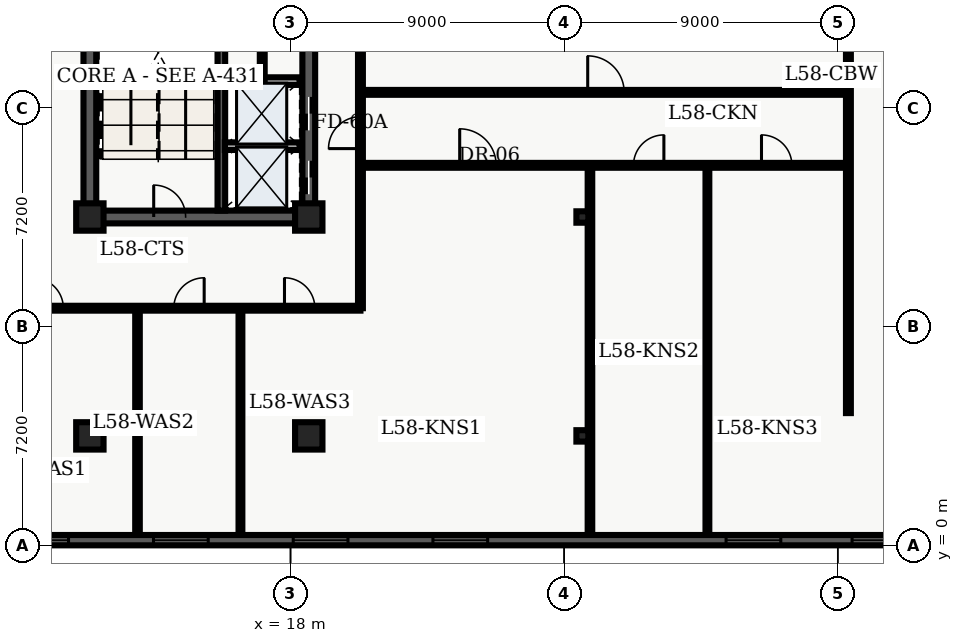
"""IFC4 building model, lengths in metres.
Left out: names, types, materials, properties, quantities, classifications, styles, units other than length and angle.
Written with IfcOpenShell. Run it as: python <this file> out.ifc"""

import sys

from ifc_helpers import new_model, entity, si_unit, converted_unit, direction, frame, origin_with_axes, origin_2d_with_axis, place, context, subcontext, project, spatial, polyline, rectangle, i_section, outline, extrude, element, fill, save


model = new_model("IFC4")
c1 = context("Model", 3, precision=1e-05, world=origin_with_axes(), true_north=direction((0.0, 1.0)))
c2 = subcontext(c1, "Body", "Model", "MODEL_VIEW")
j1 = project(units=[si_unit("LENGTHUNIT", "METRE"), converted_unit("PLANEANGLEUNIT", "DEGREE", entity("IfcPlaneAngleMeasure", 0.017), si_unit("PLANEANGLEUNIT", "RADIAN"), dimensions=[0, 0, 0, 0, 0, 0, 0])], contexts=[c1])
p1 = place(None, origin_with_axes())
s1 = spatial("IfcSite", under=j1, at=p1, CompositionType="ELEMENT")
p2 = place(p1, origin_with_axes())
s2 = spatial("IfcBuilding", under=s1, at=p2, CompositionType="ELEMENT")
p3 = place(p2, frame((0.0, 0.0, 236.4), z_axis=(0.0, 0.0, 1.0), x_axis=(1.0, 0.0, 0.0)))
s3 = spatial("IfcBuildingStorey", under=s2, at=p3, CompositionType="ELEMENT", Elevation=236.4)
p4 = place(p3, frame((11.4, 10.8, 0.0), z_axis=(0.0, 0.0, 1.0), x_axis=(0.0, 1.0, 0.0)))
e1 = element("IfcWall", 1, at=p4, inside=s3, PredefinedType="SHEAR", context=c2, shape_type="SweptSolid", body=[
    extrude(outline(polyline([(0.0, -0.21), (27.0, -0.21), (27.0, 0.21), (0.0, 0.21), (0.0, -0.21)])), origin_with_axes(), (0.0, 0.0, 1.0), 3.66),
])
p5 = place(p3, frame((11.4, 10.8, 0.0), z_axis=(0.0, 0.0, 1.0), x_axis=(1.0, 0.0, 0.0)))
e2 = element("IfcWall", 2, at=p5, inside=s3, PredefinedType="SHEAR", context=c2, shape_type="SweptSolid", body=[
    extrude(outline(polyline([(0.0, -0.21), (7.2, -0.21), (7.2, 0.21), (0.0, 0.21), (0.0, -0.21)])), origin_with_axes(), (0.0, 0.0, 1.0), 3.66),
])
p6 = place(p5, frame((2.625, 0.0, 0.0), z_axis=(0.0, 0.0, 1.0), x_axis=(1.0, 0.0, 0.0)))
e3 = element("IfcOpeningElement", 3, at=p6, cuts=e2, PredefinedType="OPENING", context=c2, shape_type="SweptSolid", body=[
    extrude(rectangle(XDim=1.05, YDim=0.44, at=origin_2d_with_axis()), origin_with_axes(), (0.0, 0.0, 1.0), 2.15),
])
p7 = place(p3, frame((18.6, 10.8, 0.0), z_axis=(0.0, 0.0, 1.0), x_axis=(0.0, 1.0, 0.0)))
e4 = element("IfcWall", 4, at=p7, inside=s3, PredefinedType="SHEAR", context=c2, shape_type="SweptSolid", body=[
    extrude(outline(polyline([(0.0, -0.21), (13.5, -0.21), (13.5, 0.21), (0.0, 0.21), (0.0, -0.21)])), origin_with_axes(), (0.0, 0.0, 1.0), 3.66),
])
p8 = place(p7, frame((1.3, 0.0, 0.0), z_axis=(0.0, 0.0, 1.0), x_axis=(1.0, 0.0, 0.0)))
e5 = element("IfcOpeningElement", 5, at=p8, cuts=e4, PredefinedType="OPENING", context=c2, shape_type="SweptSolid", body=[
    extrude(rectangle(XDim=1.1, YDim=0.44, at=origin_2d_with_axis()), origin_with_axes(), (0.0, 0.0, 1.0), 2.15),
])
p9 = place(p7, frame((3.4, 0.0, 0.0), z_axis=(0.0, 0.0, 1.0), x_axis=(1.0, 0.0, 0.0)))
e6 = element("IfcOpeningElement", 6, at=p9, cuts=e4, PredefinedType="OPENING", context=c2, shape_type="SweptSolid", body=[
    extrude(rectangle(XDim=1.1, YDim=0.44, at=origin_2d_with_axis()), origin_with_axes(), (0.0, 0.0, 1.0), 2.15),
])
p10 = place(p7, frame((11.125, 0.0, 0.0), z_axis=(0.0, 0.0, 1.0), x_axis=(1.0, 0.0, 0.0)))
e7 = element("IfcOpeningElement", 7, at=p10, cuts=e4, PredefinedType="OPENING", context=c2, shape_type="SweptSolid", body=[
    extrude(rectangle(XDim=1.05, YDim=0.44, at=origin_2d_with_axis()), origin_with_axes(), (0.0, 0.0, 1.0), 2.15),
])
p11 = place(p7, frame((6.675, 0.0, 0.0), z_axis=(0.0, 0.0, 1.0), x_axis=(1.0, 0.0, 0.0)))
e8 = element("IfcOpeningElement", 8, at=p11, cuts=e4, PredefinedType="OPENING", context=c2, shape_type="SweptSolid", body=[
    extrude(rectangle(XDim=0.95, YDim=0.44, at=origin_2d_with_axis()), origin_with_axes(), (0.0, 0.0, 1.0), 2.15),
])
p12 = place(p3, frame((15.725, 11.01, 0.0), z_axis=(0.0, 0.0, 1.0), x_axis=(0.0, 1.0, 0.0)))
e9 = element("IfcWall", 9, at=p12, inside=s3, PredefinedType="SHEAR", context=c2, shape_type="SweptSolid", body=[
    extrude(outline(polyline([(0.0, -0.125), (8.69, -0.125), (8.69, 0.125), (0.0, 0.125), (0.0, -0.125)])), origin_with_axes(), (0.0, 0.0, 1.0), 3.66),
])
for number, where, z_axis, x_axis in (
    (10, (11.4, 3.6, 0.0), (0.0, 0.0, 1.0), (1.0, 0.0, 0.0)),
    (11, (11.4, 10.8, 0.0), (0.0, 0.0, 1.0), (1.0, 0.0, 0.0)),
    (12, (18.6, 3.6, 0.0), (0.0, 0.0, 1.0), (1.0, 0.0, 0.0)),
    (13, (18.6, 10.8, 0.0), (0.0, 0.0, 1.0), (1.0, 0.0, 0.0)),
):
    element("IfcColumn", number, at=place(p3, frame(where, z_axis=z_axis, x_axis=x_axis)), inside=s3, PredefinedType="COLUMN", context=c2, shape_type="SweptSolid", body=[
        extrude(rectangle(XDim=0.9, YDim=0.9, at=origin_2d_with_axis()), origin_with_axes(), (0.0, 0.0, 1.0), 3.9),
    ])
for number, where, z_axis, x_axis in (
    (14, (27.6, 3.6, 0.0), (0.0, 0.0, 1.0), (1.0, 0.0, 0.0)),
    (15, (27.6, 10.8, 0.0), (0.0, 0.0, 1.0), (1.0, 0.0, 0.0)),
):
    element("IfcColumn", number, at=place(p3, frame(where, z_axis=z_axis, x_axis=x_axis)), inside=s3, PredefinedType="COLUMN", context=c2, shape_type="SweptSolid", body=[
        extrude(i_section(OverallWidth=0.394, OverallDepth=0.375, WebThickness=0.017, FlangeThickness=0.028, FilletRadius=0.02, at=origin_2d_with_axis()), origin_with_axes(), (0.0, 0.0, 1.0), 3.9),
    ])
for number, where, z_axis, x_axis in (
    (16, (15.84, 13.13, 0.0), (0.0, 0.0, 1.0), (1.0, 0.0, 0.0)),
    (17, (15.84, 15.27, 0.0), (0.0, 0.0, 1.0), (1.0, 0.0, 0.0)),
):
    element("IfcWall", number, at=place(p3, frame(where, z_axis=z_axis, x_axis=x_axis)), inside=s3, PredefinedType="SOLIDWALL", context=c2, shape_type="SweptSolid", body=[
        extrude(outline(polyline([(0.0, -0.125), (2.46, -0.125), (2.46, 0.125), (0.0, 0.125), (0.0, -0.125)])), origin_with_axes(), (0.0, 0.0, 1.0), 2.7),
    ])
p13 = place(p3, frame((17.07, 15.34, 0.0), z_axis=(0.0, 0.0, 1.0), x_axis=(0.0, 1.0, 0.0)))
e18 = element("IfcWall", 18, at=p13, inside=s3, PredefinedType="PARTITIONING", context=c2, shape_type="SweptSolid", body=[
    extrude(outline(polyline([(0.0, -0.08), (4.36, -0.08), (4.36, 0.08), (0.0, 0.08), (0.0, -0.08)])), origin_with_axes(), (0.0, 0.0, 1.0), 2.7),
])
p14 = place(p13, frame((2.05, 0.0, 0.0), z_axis=(0.0, 0.0, 1.0), x_axis=(1.0, 0.0, 0.0)))
e19 = element("IfcOpeningElement", 19, at=p14, cuts=e18, PredefinedType="OPENING", context=c2, shape_type="SweptSolid", body=[
    extrude(rectangle(XDim=0.9, YDim=0.18, at=origin_2d_with_axis()), origin_with_axes(), (0.0, 0.0, 1.0), 2.15),
])
p15 = place(p3, frame((7.1, 7.8, 0.0), z_axis=(0.0, 0.0, 1.0), x_axis=(1.0, 0.0, 0.0)))
e20 = element("IfcWall", 20, at=p15, inside=s3, PredefinedType="PARTITIONING", context=c2, shape_type="SweptSolid", body=[
    extrude(outline(polyline([(0.0, -0.08), (13.2, -0.08), (13.2, 0.08), (0.0, 0.08), (0.0, -0.08)])), origin_with_axes(), (0.0, 0.0, 1.0), 2.7),
])
p16 = place(p15, frame((2.929, 0.0, 0.0), z_axis=(0.0, 0.0, 1.0), x_axis=(1.0, 0.0, 0.0)))
e21 = element("IfcOpeningElement", 21, at=p16, cuts=e20, PredefinedType="OPENING", context=c2, shape_type="SweptSolid", body=[
    extrude(rectangle(XDim=1.0, YDim=0.18, at=origin_2d_with_axis()), origin_with_axes(), (0.0, 0.0, 1.0), 2.15),
])
p17 = place(p15, frame((7.56, 0.0, 0.0), z_axis=(0.0, 0.0, 1.0), x_axis=(1.0, 0.0, 0.0)))
e22 = element("IfcOpeningElement", 22, at=p17, cuts=e20, PredefinedType="OPENING", context=c2, shape_type="SweptSolid", body=[
    extrude(rectangle(XDim=1.0, YDim=0.18, at=origin_2d_with_axis()), origin_with_axes(), (0.0, 0.0, 1.0), 2.15),
])
p18 = place(p15, frame((11.201, 0.0, 0.0), z_axis=(0.0, 0.0, 1.0), x_axis=(1.0, 0.0, 0.0)))
e23 = element("IfcOpeningElement", 23, at=p18, cuts=e20, PredefinedType="OPENING", context=c2, shape_type="SweptSolid", body=[
    extrude(rectangle(XDim=1.0, YDim=0.18, at=origin_2d_with_axis()), origin_with_axes(), (0.0, 0.0, 1.0), 2.15),
])
p19 = place(p3, frame((20.3, 7.8, 0.0), z_axis=(0.0, 0.0, 1.0), x_axis=(0.0, 1.0, 0.0)))
e24 = element("IfcWall", 24, at=p19, inside=s3, PredefinedType="PARTITIONING", context=c2, shape_type="SweptSolid", body=[
    extrude(outline(polyline([(0.0, -0.08), (32.7, -0.08), (32.7, 0.08), (0.0, 0.08), (0.0, -0.08)])), origin_with_axes(), (0.0, 0.0, 1.0), 2.7),
])
p20 = place(p19, frame((14.556, 0.0, 0.0), z_axis=(0.0, 0.0, 1.0), x_axis=(1.0, 0.0, 0.0)))
e25 = element("IfcOpeningElement", 25, at=p20, cuts=e24, PredefinedType="OPENING", context=c2, shape_type="SweptSolid", body=[
    extrude(rectangle(XDim=0.9, YDim=0.18, at=origin_2d_with_axis()), origin_with_axes(), (0.0, 0.0, 1.0), 2.15),
])
p21 = place(p19, frame((18.551, 0.0, 0.0), z_axis=(0.0, 0.0, 1.0), x_axis=(1.0, 0.0, 0.0)))
e26 = element("IfcOpeningElement", 26, at=p21, cuts=e24, PredefinedType="OPENING", context=c2, shape_type="SweptSolid", body=[
    extrude(rectangle(XDim=1.0, YDim=0.18, at=origin_2d_with_axis()), origin_with_axes(), (0.0, 0.0, 1.0), 2.15),
])
p22 = place(p19, frame((22.226, 0.0, 0.0), z_axis=(0.0, 0.0, 1.0), x_axis=(1.0, 0.0, 0.0)))
e27 = element("IfcOpeningElement", 27, at=p22, cuts=e24, PredefinedType="OPENING", context=c2, shape_type="SweptSolid", body=[
    extrude(rectangle(XDim=1.0, YDim=0.18, at=origin_2d_with_axis()), origin_with_axes(), (0.0, 0.0, 1.0), 2.15),
])
p23 = place(p19, frame((25.754, 0.0, 0.0), z_axis=(0.0, 0.0, 1.0), x_axis=(1.0, 0.0, 0.0)))
e28 = element("IfcOpeningElement", 28, at=p23, cuts=e24, PredefinedType="OPENING", context=c2, shape_type="SweptSolid", body=[
    extrude(rectangle(XDim=1.0, YDim=0.18, at=origin_2d_with_axis()), origin_with_axes(), (0.0, 0.0, 1.0), 2.15),
])
p24 = place(p19, frame((5.775, 0.0, 0.0), z_axis=(0.0, 0.0, 1.0), x_axis=(1.0, 0.0, 0.0)))
e29 = element("IfcOpeningElement", 29, at=p24, cuts=e24, PredefinedType="OPENING", context=c2, shape_type="SweptSolid", body=[
    extrude(rectangle(XDim=1.05, YDim=0.18, at=origin_2d_with_axis()), origin_with_axes(), (0.0, 0.0, 1.0), 2.15),
])
p25 = place(p3, frame((12.967, 0.335, 0.0), z_axis=(0.0, 0.0, 1.0), x_axis=(0.0, 1.0, 0.0)))
e30 = element("IfcWall", 30, at=p25, inside=s3, PredefinedType="PARTITIONING", context=c2, shape_type="SweptSolid", body=[
    extrude(outline(polyline([(0.0, -0.075), (7.365, -0.075), (7.365, 0.075), (0.0, 0.075), (0.0, -0.075)])), origin_with_axes(), (0.0, 0.0, 1.0), 2.7),
])
p26 = place(p3, frame((16.353, 0.335, 0.0), z_axis=(0.0, 0.0, 1.0), x_axis=(0.0, 1.0, 0.0)))
e31 = element("IfcWall", 31, at=p26, inside=s3, PredefinedType="PARTITIONING", context=c2, shape_type="SweptSolid", body=[
    extrude(outline(polyline([(0.0, -0.062), (7.365, -0.062), (7.365, 0.062), (0.0, 0.062), (0.0, -0.062)])), origin_with_axes(), (0.0, 0.0, 1.0), 2.7),
])
p27 = place(p3, frame((20.3, 12.5, 0.0), z_axis=(0.0, 0.0, 1.0), x_axis=(1.0, 0.0, 0.0)))
e32 = element("IfcWall", 32, at=p27, inside=s3, PredefinedType="PARTITIONING", context=c2, shape_type="SweptSolid", body=[
    extrude(outline(polyline([(0.0, -0.08), (16.05, -0.08), (16.05, 0.08), (0.0, 0.08), (0.0, -0.08)])), origin_with_axes(), (0.0, 0.0, 1.0), 2.7),
])
p28 = place(p27, frame((3.865, 0.0, 0.0), z_axis=(0.0, 0.0, 1.0), x_axis=(1.0, 0.0, 0.0)))
e33 = element("IfcOpeningElement", 33, at=p28, cuts=e32, PredefinedType="OPENING", context=c2, shape_type="SweptSolid", body=[
    extrude(rectangle(XDim=1.2, YDim=0.18, at=origin_2d_with_axis()), origin_with_axes(), (0.0, 0.0, 1.0), 2.2),
])
p29 = place(p27, frame((9.48, 0.0, 0.0), z_axis=(0.0, 0.0, 1.0), x_axis=(1.0, 0.0, 0.0)))
e34 = element("IfcOpeningElement", 34, at=p29, cuts=e32, PredefinedType="OPENING", context=c2, shape_type="SweptSolid", body=[
    extrude(rectangle(XDim=1.0, YDim=0.18, at=origin_2d_with_axis()), origin_with_axes(), (0.0, 0.0, 1.0), 2.15),
])
p30 = place(p27, frame((13.691, 0.0, 0.0), z_axis=(0.0, 0.0, 1.0), x_axis=(1.0, 0.0, 0.0)))
e35 = element("IfcOpeningElement", 35, at=p30, cuts=e32, PredefinedType="OPENING", context=c2, shape_type="SweptSolid", body=[
    extrude(rectangle(XDim=1.0, YDim=0.18, at=origin_2d_with_axis()), origin_with_axes(), (0.0, 0.0, 1.0), 2.15),
])
p31 = place(p3, frame((20.3, 14.9, 0.0), z_axis=(0.0, 0.0, 1.0), x_axis=(1.0, 0.0, 0.0)))
e36 = element("IfcWall", 36, at=p31, inside=s3, PredefinedType="PARTITIONING", context=c2, shape_type="SweptSolid", body=[
    extrude(outline(polyline([(0.0, -0.08), (16.05, -0.08), (16.05, 0.08), (0.0, 0.08), (0.0, -0.08)])), origin_with_axes(), (0.0, 0.0, 1.0), 2.7),
])
p32 = place(p31, frame((8.075, 0.0, 0.0), z_axis=(0.0, 0.0, 1.0), x_axis=(1.0, 0.0, 0.0)))
e37 = element("IfcOpeningElement", 37, at=p32, cuts=e36, PredefinedType="OPENING", context=c2, shape_type="SweptSolid", body=[
    extrude(rectangle(XDim=1.2, YDim=0.18, at=origin_2d_with_axis()), origin_with_axes(), (0.0, 0.0, 1.0), 2.2),
])
p33 = place(p3, frame((36.35, 4.35, 0.0), z_axis=(0.0, 0.0, 1.0), x_axis=(0.0, 1.0, 0.0)))
e38 = element("IfcWall", 38, at=p33, inside=s3, PredefinedType="PARTITIONING", context=c2, shape_type="SweptSolid", body=[
    extrude(outline(polyline([(0.0, -0.08), (16.95, -0.08), (16.95, 0.08), (0.0, 0.08), (0.0, -0.08)])), origin_with_axes(), (0.0, 0.0, 1.0), 2.7),
])
p34 = place(p3, frame((27.849, 0.335, 0.0), z_axis=(0.0, 0.0, 1.0), x_axis=(0.0, 1.0, 0.0)))
e39 = element("IfcWall", 39, at=p34, inside=s3, PredefinedType="PARTITIONING", context=c2, shape_type="SweptSolid", body=[
    extrude(outline(polyline([(0.0, -0.075), (12.045, -0.075), (12.045, 0.075), (0.0, 0.075), (0.0, -0.075)])), origin_with_axes(), (0.0, 0.0, 1.0), 2.7),
])
p35 = place(p3, frame((31.712, 0.335, 0.0), z_axis=(0.0, 0.0, 1.0), x_axis=(0.0, 1.0, 0.0)))
e40 = element("IfcWall", 40, at=p35, inside=s3, PredefinedType="PARTITIONING", context=c2, shape_type="SweptSolid", body=[
    extrude(outline(polyline([(0.0, -0.062), (12.045, -0.062), (12.045, 0.062), (0.0, 0.062), (0.0, -0.062)])), origin_with_axes(), (0.0, 0.0, 1.0), 2.7),
])
p36 = place(p3, frame((49.46, 0.17, 0.0), z_axis=(0.0, 0.0, 1.0), x_axis=(-1.0, 0.0, 0.0)))
e41 = element("IfcWall", 41, at=p36, inside=s3, PredefinedType="SOLIDWALL", context=c2, shape_type="SweptSolid", body=[
    extrude(outline(polyline([(0.0, -0.17), (42.56, -0.17), (42.56, 0.17), (0.0, 0.17), (0.0, -0.17)])), origin_with_axes(), (0.0, 0.0, 1.0), 3.66),
])
p37 = place(p36, frame((2.898, 0.0, 0.45), z_axis=(0.0, 0.0, 1.0), x_axis=(1.0, 0.0, 0.0)))
e42 = element("IfcOpeningElement", 42, at=p37, cuts=e41, PredefinedType="OPENING", context=c2, shape_type="SweptSolid", body=[
    extrude(rectangle(XDim=1.8, YDim=0.36, at=origin_2d_with_axis()), origin_with_axes(), (0.0, 0.0, 1.0), 2.1),
])
p38 = place(p36, frame((7.493, 0.0, 0.45), z_axis=(0.0, 0.0, 1.0), x_axis=(1.0, 0.0, 0.0)))
e43 = element("IfcOpeningElement", 43, at=p38, cuts=e41, PredefinedType="OPENING", context=c2, shape_type="SweptSolid", body=[
    extrude(rectangle(XDim=1.8, YDim=0.36, at=origin_2d_with_axis()), origin_with_axes(), (0.0, 0.0, 1.0), 2.1),
])
p39 = place(p36, frame((12.089, 0.0, 0.45), z_axis=(0.0, 0.0, 1.0), x_axis=(1.0, 0.0, 0.0)))
e44 = element("IfcOpeningElement", 44, at=p39, cuts=e41, PredefinedType="OPENING", context=c2, shape_type="SweptSolid", body=[
    extrude(rectangle(XDim=1.8, YDim=0.36, at=origin_2d_with_axis()), origin_with_axes(), (0.0, 0.0, 1.0), 2.1),
])
p40 = place(p36, frame((16.234, 0.0, 0.45), z_axis=(0.0, 0.0, 1.0), x_axis=(1.0, 0.0, 0.0)))
e45 = element("IfcOpeningElement", 45, at=p40, cuts=e41, PredefinedType="OPENING", context=c2, shape_type="SweptSolid", body=[
    extrude(rectangle(XDim=1.8, YDim=0.36, at=origin_2d_with_axis()), origin_with_axes(), (0.0, 0.0, 1.0), 2.1),
])
p41 = place(p36, frame((25.876, 0.0, 0.45), z_axis=(0.0, 0.0, 1.0), x_axis=(1.0, 0.0, 0.0)))
e46 = element("IfcOpeningElement", 46, at=p41, cuts=e41, PredefinedType="OPENING", context=c2, shape_type="SweptSolid", body=[
    extrude(rectangle(XDim=1.8, YDim=0.36, at=origin_2d_with_axis()), origin_with_axes(), (0.0, 0.0, 1.0), 2.1),
])
p42 = place(p36, frame((30.471, 0.0, 0.45), z_axis=(0.0, 0.0, 1.0), x_axis=(1.0, 0.0, 0.0)))
e47 = element("IfcOpeningElement", 47, at=p42, cuts=e41, PredefinedType="OPENING", context=c2, shape_type="SweptSolid", body=[
    extrude(rectangle(XDim=1.8, YDim=0.36, at=origin_2d_with_axis()), origin_with_axes(), (0.0, 0.0, 1.0), 2.1),
])
p43 = place(p36, frame((35.067, 0.0, 0.45), z_axis=(0.0, 0.0, 1.0), x_axis=(1.0, 0.0, 0.0)))
e48 = element("IfcOpeningElement", 48, at=p43, cuts=e41, PredefinedType="OPENING", context=c2, shape_type="SweptSolid", body=[
    extrude(rectangle(XDim=1.8, YDim=0.36, at=origin_2d_with_axis()), origin_with_axes(), (0.0, 0.0, 1.0), 2.1),
])
p44 = place(p36, frame((39.662, 0.0, 0.45), z_axis=(0.0, 0.0, 1.0), x_axis=(1.0, 0.0, 0.0)))
e49 = element("IfcOpeningElement", 49, at=p44, cuts=e41, PredefinedType="OPENING", context=c2, shape_type="SweptSolid", body=[
    extrude(rectangle(XDim=1.8, YDim=0.36, at=origin_2d_with_axis()), origin_with_axes(), (0.0, 0.0, 1.0), 2.1),
])
p45 = place(p7, frame((1.3, 0.0, 0.0), z_axis=(0.0, 0.0, 1.0), x_axis=(1.0, 0.0, 0.0)))
e50 = element("IfcDoor", 50, at=p45, inside=s3, OperationType="SLIDING_TO_LEFT", PredefinedType="DOOR", context=c2, shape_type="SweptSolid", body=[
    extrude(rectangle(XDim=1.1, YDim=0.09, at=origin_2d_with_axis()), origin_with_axes(), (0.0, 0.0, 1.0), 2.15),
])
fill(e5, e50)
p46 = place(p7, frame((3.4, 0.0, 0.0), z_axis=(0.0, 0.0, 1.0), x_axis=(1.0, 0.0, 0.0)))
e51 = element("IfcDoor", 51, at=p46, inside=s3, OperationType="SLIDING_TO_RIGHT", PredefinedType="DOOR", context=c2, shape_type="SweptSolid", body=[
    extrude(rectangle(XDim=1.1, YDim=0.09, at=origin_2d_with_axis()), origin_with_axes(), (0.0, 0.0, 1.0), 2.15),
])
fill(e6, e51)
p47 = place(p5, frame((2.625, 0.0, 0.0), z_axis=(0.0, 0.0, 1.0), x_axis=(1.0, 0.0, 0.0)))
e52 = element("IfcDoor", 52, at=p47, inside=s3, OperationType="SINGLE_SWING_LEFT", PredefinedType="DOOR", context=c2, shape_type="SweptSolid", body=[
    extrude(rectangle(XDim=1.05, YDim=0.09, at=origin_2d_with_axis()), origin_with_axes(), (0.0, 0.0, 1.0), 2.15),
])
fill(e3, e52)
p48 = place(p15, frame((2.929, 0.0, 0.0), z_axis=(0.0, 0.0, 1.0), x_axis=(1.0, 0.0, 0.0)))
e53 = element("IfcDoor", 53, at=p48, inside=s3, OperationType="SINGLE_SWING_LEFT", PredefinedType="DOOR", context=c2, shape_type="SweptSolid", body=[
    extrude(rectangle(XDim=1.0, YDim=0.09, at=origin_2d_with_axis()), origin_with_axes(), (0.0, 0.0, 1.0), 2.15),
])
fill(e21, e53)
p49 = place(p15, frame((7.56, 0.0, 0.0), z_axis=(0.0, 0.0, 1.0), x_axis=(1.0, 0.0, 0.0)))
e54 = element("IfcDoor", 54, at=p49, inside=s3, OperationType="SINGLE_SWING_RIGHT", PredefinedType="DOOR", context=c2, shape_type="SweptSolid", body=[
    extrude(rectangle(XDim=1.0, YDim=0.09, at=origin_2d_with_axis()), origin_with_axes(), (0.0, 0.0, 1.0), 2.15),
])
fill(e22, e54)
p50 = place(p15, frame((11.201, 0.0, 0.0), z_axis=(0.0, 0.0, 1.0), x_axis=(1.0, 0.0, 0.0)))
e55 = element("IfcDoor", 55, at=p50, inside=s3, OperationType="SINGLE_SWING_LEFT", PredefinedType="DOOR", context=c2, shape_type="SweptSolid", body=[
    extrude(rectangle(XDim=1.0, YDim=0.09, at=origin_2d_with_axis()), origin_with_axes(), (0.0, 0.0, 1.0), 2.15),
])
fill(e23, e55)
p51 = place(p19, frame((5.775, 0.0, 0.0), z_axis=(0.0, 0.0, 1.0), x_axis=(1.0, 0.0, 0.0)))
e56 = element("IfcDoor", 56, at=p51, inside=s3, OperationType="SINGLE_SWING_LEFT", PredefinedType="DOOR", context=c2, shape_type="SweptSolid", body=[
    extrude(rectangle(XDim=1.05, YDim=0.09, at=origin_2d_with_axis()), origin_with_axes(), (0.0, 0.0, 1.0), 2.15),
])
fill(e29, e56)
p52 = place(p27, frame((3.865, 0.0, 0.0), z_axis=(0.0, 0.0, 1.0), x_axis=(1.0, 0.0, 0.0)))
e57 = element("IfcDoor", 57, at=p52, inside=s3, OperationType="SINGLE_SWING_LEFT", PredefinedType="DOOR", context=c2, shape_type="SweptSolid", body=[
    extrude(rectangle(XDim=1.2, YDim=0.09, at=origin_2d_with_axis()), origin_with_axes(), (0.0, 0.0, 1.0), 2.2),
])
fill(e33, e57)
p53 = place(p27, frame((9.48, 0.0, 0.0), z_axis=(0.0, 0.0, 1.0), x_axis=(1.0, 0.0, 0.0)))
e58 = element("IfcDoor", 58, at=p53, inside=s3, OperationType="SINGLE_SWING_RIGHT", PredefinedType="DOOR", context=c2, shape_type="SweptSolid", body=[
    extrude(rectangle(XDim=1.0, YDim=0.09, at=origin_2d_with_axis()), origin_with_axes(), (0.0, 0.0, 1.0), 2.15),
])
fill(e34, e58)
p54 = place(p27, frame((13.691, 0.0, 0.0), z_axis=(0.0, 0.0, 1.0), x_axis=(1.0, 0.0, 0.0)))
e59 = element("IfcDoor", 59, at=p54, inside=s3, OperationType="SINGLE_SWING_LEFT", PredefinedType="DOOR", context=c2, shape_type="SweptSolid", body=[
    extrude(rectangle(XDim=1.0, YDim=0.09, at=origin_2d_with_axis()), origin_with_axes(), (0.0, 0.0, 1.0), 2.15),
])
fill(e35, e59)
p55 = place(p31, frame((8.075, 0.0, 0.0), z_axis=(0.0, 0.0, 1.0), x_axis=(1.0, 0.0, 0.0)))
e60 = element("IfcDoor", 60, at=p55, inside=s3, OperationType="SINGLE_SWING_LEFT", PredefinedType="DOOR", context=c2, shape_type="SweptSolid", body=[
    extrude(rectangle(XDim=1.2, YDim=0.09, at=origin_2d_with_axis()), origin_with_axes(), (0.0, 0.0, 1.0), 2.2),
])
fill(e37, e60)
p56 = place(p36, frame((12.089, 0.0, 0.45), z_axis=(0.0, 0.0, 1.0), x_axis=(1.0, 0.0, 0.0)))
e61 = element("IfcWindow", 61, at=p56, inside=s3, PredefinedType="WINDOW", context=c2, shape_type="SweptSolid", body=[
    extrude(rectangle(XDim=1.8, YDim=0.09, at=origin_2d_with_axis()), origin_with_axes(), (0.0, 0.0, 1.0), 2.1),
])
fill(e44, e61)
p57 = place(p36, frame((16.234, 0.0, 0.45), z_axis=(0.0, 0.0, 1.0), x_axis=(1.0, 0.0, 0.0)))
e62 = element("IfcWindow", 62, at=p57, inside=s3, PredefinedType="WINDOW", context=c2, shape_type="SweptSolid", body=[
    extrude(rectangle(XDim=1.8, YDim=0.09, at=origin_2d_with_axis()), origin_with_axes(), (0.0, 0.0, 1.0), 2.1),
])
fill(e45, e62)
p58 = place(p36, frame((25.876, 0.0, 0.45), z_axis=(0.0, 0.0, 1.0), x_axis=(1.0, 0.0, 0.0)))
e63 = element("IfcWindow", 63, at=p58, inside=s3, PredefinedType="WINDOW", context=c2, shape_type="SweptSolid", body=[
    extrude(rectangle(XDim=1.8, YDim=0.09, at=origin_2d_with_axis()), origin_with_axes(), (0.0, 0.0, 1.0), 2.1),
])
fill(e46, e63)
p59 = place(p36, frame((30.471, 0.0, 0.45), z_axis=(0.0, 0.0, 1.0), x_axis=(1.0, 0.0, 0.0)))
e64 = element("IfcWindow", 64, at=p59, inside=s3, PredefinedType="WINDOW", context=c2, shape_type="SweptSolid", body=[
    extrude(rectangle(XDim=1.8, YDim=0.09, at=origin_2d_with_axis()), origin_with_axes(), (0.0, 0.0, 1.0), 2.1),
])
fill(e47, e64)
p60 = place(p36, frame((35.067, 0.0, 0.45), z_axis=(0.0, 0.0, 1.0), x_axis=(1.0, 0.0, 0.0)))
e65 = element("IfcWindow", 65, at=p60, inside=s3, PredefinedType="WINDOW", context=c2, shape_type="SweptSolid", body=[
    extrude(rectangle(XDim=1.8, YDim=0.09, at=origin_2d_with_axis()), origin_with_axes(), (0.0, 0.0, 1.0), 2.1),
])
fill(e48, e65)
p61 = place(p36, frame((39.662, 0.0, 0.45), z_axis=(0.0, 0.0, 1.0), x_axis=(1.0, 0.0, 0.0)))
e66 = element("IfcWindow", 66, at=p61, inside=s3, PredefinedType="WINDOW", context=c2, shape_type="SweptSolid", body=[
    extrude(rectangle(XDim=1.8, YDim=0.09, at=origin_2d_with_axis()), origin_with_axes(), (0.0, 0.0, 1.0), 2.1),
])
fill(e49, e66)
save(model, sys.argv[1])
